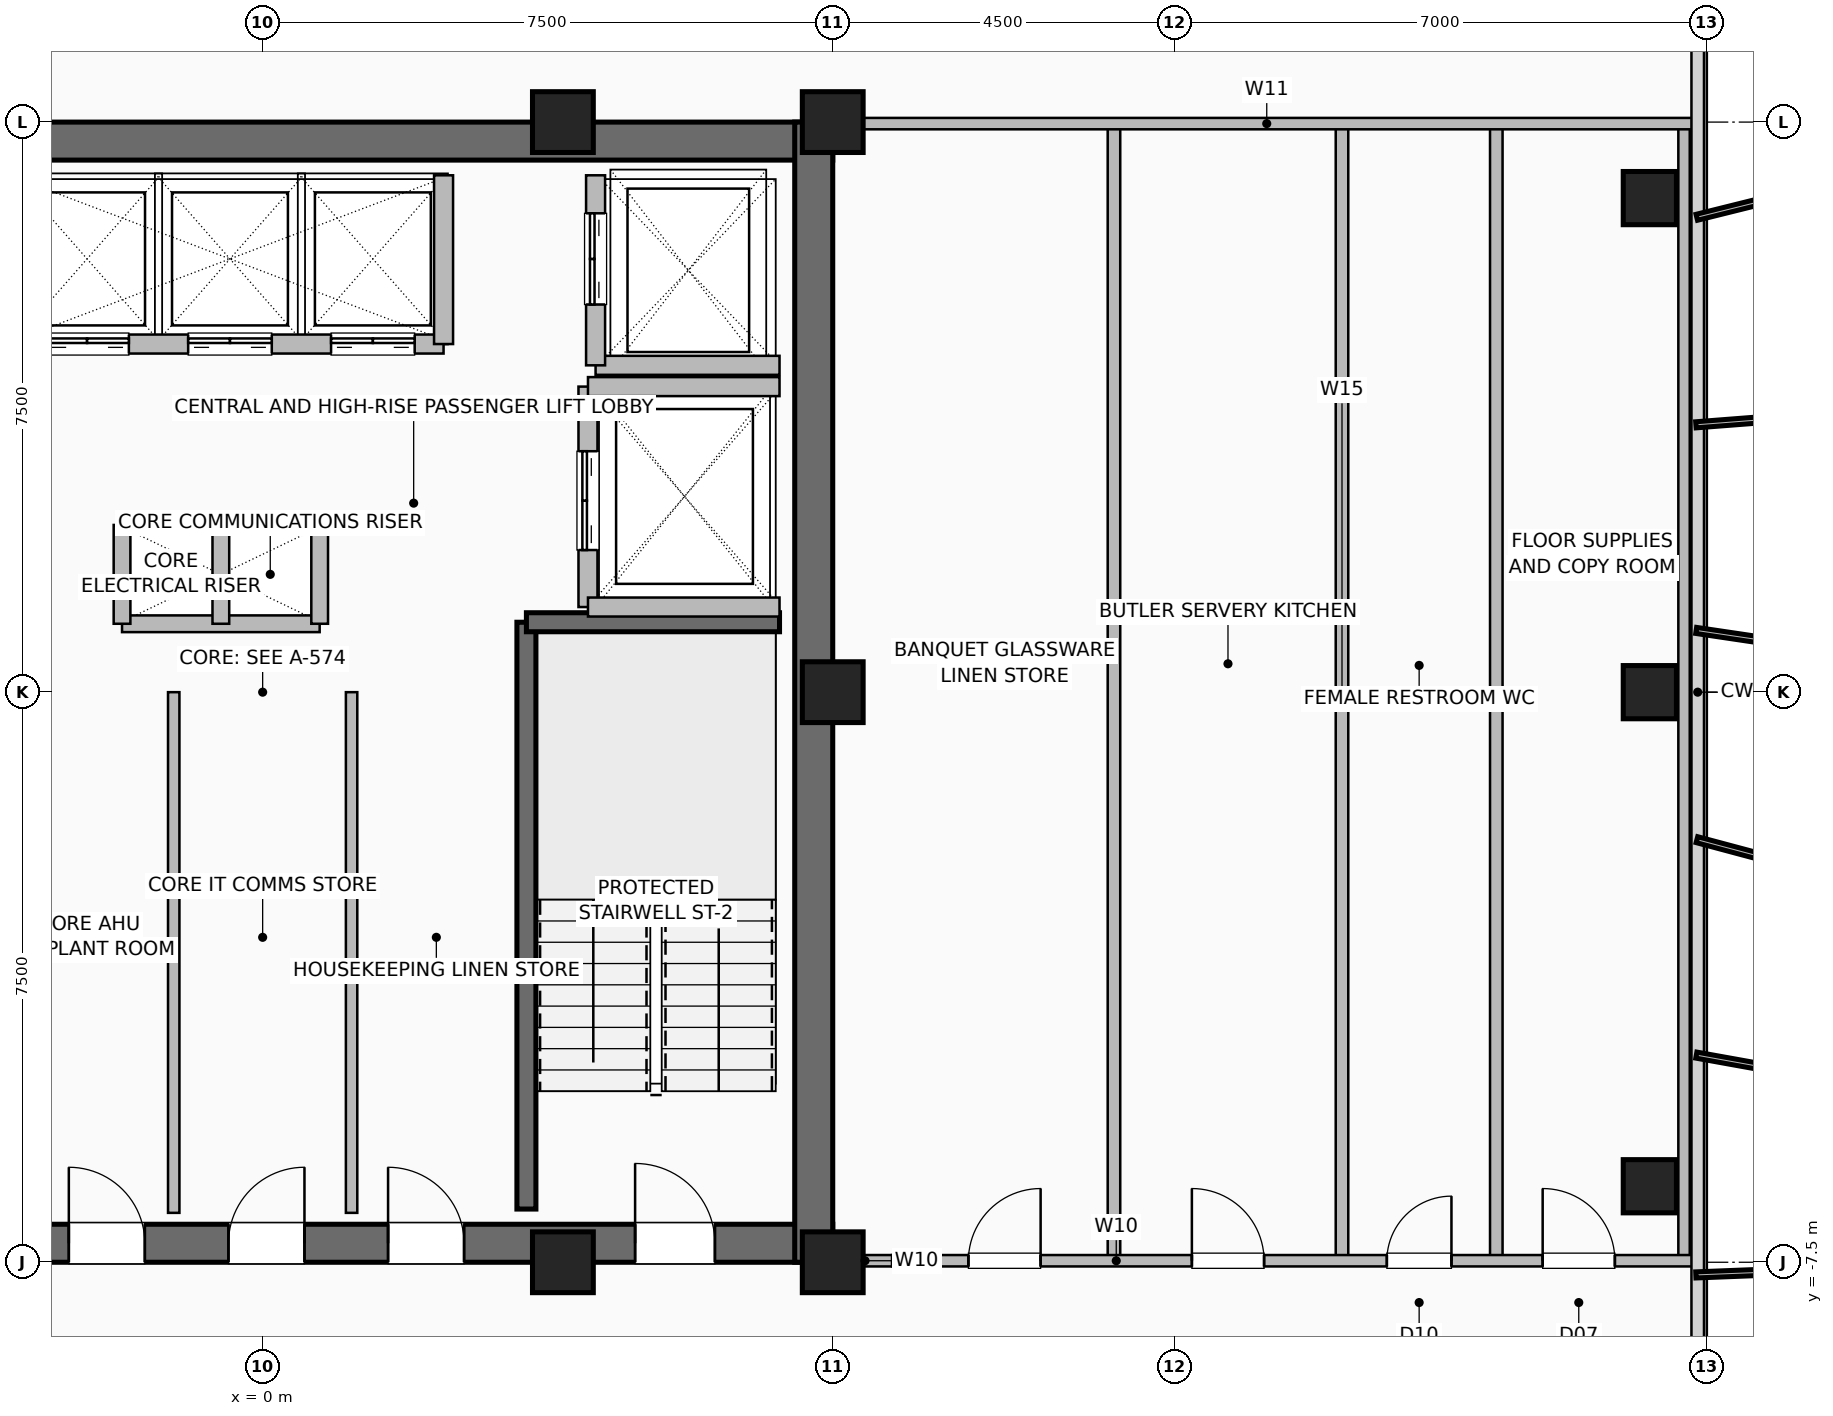
"""IFC4 building model, lengths in metres.
Left out: names, types, materials, properties, quantities, classifications, styles, units other than length and angle.
Written with IfcOpenShell. Run it as: python <this file> out.ifc"""

import sys

from ifc_helpers import new_model, si_unit, direction, frame, frame_2d, origin, origin_2d, place, context, subcontext, project, spatial, rectangle, hollow_rectangle, extrude, element, fill, save


model = new_model("IFC4")
c1 = context("Model", 3, precision=1e-05, world=origin(), true_north=direction((0.0, 1.0)))
c2 = subcontext(c1, "Body", "Model", "MODEL_VIEW")
j1 = project(units=[si_unit("LENGTHUNIT", "METRE"), si_unit("PLANEANGLEUNIT", "RADIAN")], contexts=[c1])
p1 = place(None, origin())
s1 = spatial("IfcSite", under=j1, at=p1, CompositionType="ELEMENT")
p2 = place(p1, origin())
s2 = spatial("IfcBuilding", under=s1, at=p2, CompositionType="ELEMENT")
p3 = place(p2, frame((0.0, 0.0, 293.6)))
s3 = spatial("IfcBuildingStorey", under=s2, at=p3, CompositionType="ELEMENT", Elevation=293.6)
for number, where, z_axis, x_axis in (
    (1, (3.95, -7.5, 0.0), (0.0, 0.0, 1.0), (1.0, 0.0, 0.0)),
    (2, (7.5, -7.5, 0.0), (0.0, 0.0, 1.0), (1.0, 0.0, 0.0)),
    (3, (7.5, 0.0, 0.0), (0.0, 0.0, 1.0), (1.0, 0.0, 0.0)),
    (4, (7.5, 7.5, 0.0), (0.0, 0.0, 1.0), (1.0, 0.0, 0.0)),
    (5, (3.95, 7.5, 0.0), (0.0, 0.0, 1.0), (1.0, 0.0, 0.0)),
):
    element("IfcColumn", number, at=place(p3, frame(where, z_axis=z_axis, x_axis=x_axis)), inside=s3, PredefinedType="COLUMN", context=c2, shape_type="SweptSolid", body=[
        extrude(hollow_rectangle(XDim=0.8, YDim=0.8, WallThickness=0.04, at=origin_2d()), origin(), (0.0, 0.0, 1.0), 3.6),
    ])
for number, where, z_axis, x_axis in (
    (6, (18.25, -6.5, 0.0), (0.0, 0.0, 1.0), (1.0, 0.0, 0.0)),
    (7, (18.25, 0.0, 0.0), (0.0, 0.0, 1.0), (1.0, 0.0, 0.0)),
    (8, (18.25, 6.5, 0.0), (0.0, 0.0, 1.0), (1.0, 0.0, 0.0)),
):
    element("IfcColumn", number, at=place(p3, frame(where, z_axis=z_axis, x_axis=x_axis)), inside=s3, PredefinedType="COLUMN", context=c2, shape_type="SweptSolid", body=[
        extrude(hollow_rectangle(XDim=0.7, YDim=0.7, WallThickness=0.035, at=origin_2d()), origin(), (0.0, 0.0, 1.0), 3.6),
    ])
p4 = place(p3, frame((-7.5, -7.25, 0.0), z_axis=(0.0, 0.0, 1.0), x_axis=(1.0, 0.0, 0.0)))
e9 = element("IfcWall", 9, at=p4, inside=s3, PredefinedType="SHEAR", context=c2, shape_type="SweptSolid", body=[
    extrude(rectangle(XDim=15.0, YDim=0.5, at=frame_2d((7.5, 0.0))), origin(), (0.0, 0.0, 1.0), 3.36),
])
p5 = place(p4, frame((1.55, 0.0, 0.0)))
e10 = element("IfcOpeningElement", 10, at=p5, cuts=e9, PredefinedType="OPENING", context=c2, shape_type="SweptSolid", body=[
    extrude(rectangle(XDim=1.05, YDim=2.08, at=frame_2d((0.525, 1.04))), frame((0.0, 0.26, 0.0), z_axis=(0.0, -1.0, 0.0), x_axis=(1.0, 0.0, 0.0)), (0.0, 0.0, 1.0), 0.52),
])
p6 = place(p4, frame((12.4, 0.0, 0.0)))
e11 = element("IfcOpeningElement", 11, at=p6, cuts=e9, PredefinedType="OPENING", context=c2, shape_type="SweptSolid", body=[
    extrude(rectangle(XDim=1.05, YDim=2.08, at=frame_2d((0.525, 1.04))), frame((0.0, 0.26, 0.0), z_axis=(0.0, -1.0, 0.0), x_axis=(1.0, 0.0, 0.0)), (0.0, 0.0, 1.0), 0.52),
])
p7 = place(p4, frame((4.95, 0.0, 0.0)))
e12 = element("IfcOpeningElement", 12, at=p7, cuts=e9, PredefinedType="OPENING", context=c2, shape_type="SweptSolid", body=[
    extrude(rectangle(XDim=1.0, YDim=2.08, at=frame_2d((0.5, 1.04))), frame((0.0, 0.26, 0.0), z_axis=(0.0, -1.0, 0.0), x_axis=(1.0, 0.0, 0.0)), (0.0, 0.0, 1.0), 0.52),
])
p8 = place(p4, frame((7.05, 0.0, 0.0)))
e13 = element("IfcOpeningElement", 13, at=p8, cuts=e9, PredefinedType="OPENING", context=c2, shape_type="SweptSolid", body=[
    extrude(rectangle(XDim=1.0, YDim=2.08, at=frame_2d((0.5, 1.04))), frame((0.0, 0.26, 0.0), z_axis=(0.0, -1.0, 0.0), x_axis=(1.0, 0.0, 0.0)), (0.0, 0.0, 1.0), 0.52),
])
p9 = place(p4, frame((9.15, 0.0, 0.0)))
e14 = element("IfcOpeningElement", 14, at=p9, cuts=e9, PredefinedType="OPENING", context=c2, shape_type="SweptSolid", body=[
    extrude(rectangle(XDim=1.0, YDim=2.08, at=frame_2d((0.5, 1.04))), frame((0.0, 0.26, 0.0), z_axis=(0.0, -1.0, 0.0), x_axis=(1.0, 0.0, 0.0)), (0.0, 0.0, 1.0), 0.52),
])
for number, where, z_axis, x_axis in (
    (15, (-7.5, 7.25, 0.0), (0.0, 0.0, 1.0), (1.0, 0.0, 0.0)),
    (16, (7.25, -7.5, 0.0), (0.0, 0.0, 1.0), (0.0, 1.0, 0.0)),
):
    element("IfcWall", number, at=place(p3, frame(where, z_axis=z_axis, x_axis=x_axis)), inside=s3, PredefinedType="SHEAR", context=c2, shape_type="SweptSolid", body=[
        extrude(rectangle(XDim=15.0, YDim=0.5, at=frame_2d((7.5, 0.0))), origin(), (0.0, 0.0, 1.0), 3.36),
    ])
p10 = place(p3, frame((3.47, -6.8, 0.0), z_axis=(0.0, 0.0, 1.0), x_axis=(0.0, 1.0, 0.0)))
e17 = element("IfcWall", 17, at=p10, inside=s3, PredefinedType="SHEAR", context=c2, shape_type="SweptSolid", body=[
    extrude(rectangle(XDim=7.72, YDim=0.25, at=frame_2d((3.86, 0.0))), origin(), (0.0, 0.0, 1.0), 3.36),
])
p11 = place(p3, frame((3.47, 0.92, 0.0), z_axis=(0.0, 0.0, 1.0), x_axis=(1.0, 0.0, 0.0)))
e18 = element("IfcWall", 18, at=p11, inside=s3, PredefinedType="SHEAR", context=c2, shape_type="SweptSolid", body=[
    extrude(rectangle(XDim=3.33, YDim=0.25, at=frame_2d((1.665, 0.0))), origin(), (0.0, 0.0, 1.0), 3.36),
])
for number, where, z_axis, x_axis in (
    (19, (-1.85, 2.2, 0.0), (0.0, 0.0, 1.0), (1.0, 0.0, 0.0)),
    (20, (-1.85, 0.9, 0.0), (0.0, 0.0, 1.0), (1.0, 0.0, 0.0)),
):
    element("IfcWall", number, at=place(p3, frame(where, z_axis=z_axis, x_axis=x_axis)), inside=s3, PredefinedType="PARTITIONING", context=c2, shape_type="SweptSolid", body=[
        extrude(rectangle(XDim=2.6, YDim=0.22, at=frame_2d((1.3, 0.0))), origin(), (0.0, 0.0, 1.0), 3.36),
    ])
for number, where, z_axis, x_axis in (
    (21, (-0.55, 0.9, 0.0), (0.0, 0.0, 1.0), (0.0, 1.0, 0.0)),
    (22, (0.75, 0.9, 0.0), (0.0, 0.0, 1.0), (0.0, 1.0, 0.0)),
    (23, (-1.85, 0.9, 0.0), (0.0, 0.0, 1.0), (0.0, 1.0, 0.0)),
):
    element("IfcWall", number, at=place(p3, frame(where, z_axis=z_axis, x_axis=x_axis)), inside=s3, PredefinedType="PARTITIONING", context=c2, shape_type="SweptSolid", body=[
        extrude(rectangle(XDim=1.3, YDim=0.22, at=frame_2d((0.65, 0.0))), origin(), (0.0, 0.0, 1.0), 3.36),
    ])
p12 = place(p3, frame((-3.26, 4.58, 0.0), z_axis=(0.0, 0.0, 1.0), x_axis=(1.0, 0.0, 0.0)))
e24 = element("IfcWall", 24, at=p12, inside=s3, PredefinedType="SHEAR", context=c2, shape_type="SweptSolid", body=[
    extrude(rectangle(XDim=5.64, YDim=0.25, at=frame_2d((2.82, 0.0))), origin(), (0.0, 0.0, 1.0), 3.36),
])
p13 = place(p12, frame((0.4, 0.0, 0.0)))
e25 = element("IfcOpeningElement", 25, at=p13, cuts=e24, PredefinedType="OPENING", context=c2, shape_type="SweptSolid", body=[
    extrude(rectangle(XDim=1.1, YDim=2.2, at=frame_2d((0.55, 1.1))), frame((0.0, 0.135, 0.0), z_axis=(0.0, -1.0, 0.0), x_axis=(1.0, 0.0, 0.0)), (0.0, 0.0, 1.0), 0.27),
])
p14 = place(p12, frame((2.28, 0.0, 0.0)))
e26 = element("IfcOpeningElement", 26, at=p14, cuts=e24, PredefinedType="OPENING", context=c2, shape_type="SweptSolid", body=[
    extrude(rectangle(XDim=1.1, YDim=2.2, at=frame_2d((0.55, 1.1))), frame((0.0, 0.135, 0.0), z_axis=(0.0, -1.0, 0.0), x_axis=(1.0, 0.0, 0.0)), (0.0, 0.0, 1.0), 0.27),
])
p15 = place(p12, frame((4.16, 0.0, 0.0)))
e27 = element("IfcOpeningElement", 27, at=p15, cuts=e24, PredefinedType="OPENING", context=c2, shape_type="SweptSolid", body=[
    extrude(rectangle(XDim=1.1, YDim=2.2, at=frame_2d((0.55, 1.1))), frame((0.0, 0.135, 0.0), z_axis=(0.0, -1.0, 0.0), x_axis=(1.0, 0.0, 0.0)), (0.0, 0.0, 1.0), 0.27),
])
p16 = place(p3, frame((2.38, 4.58, 0.0), z_axis=(0.0, 0.0, 1.0), x_axis=(0.0, 1.0, 0.0)))
e28 = element("IfcWall", 28, at=p16, inside=s3, PredefinedType="SHEAR", context=c2, shape_type="SweptSolid", body=[
    extrude(rectangle(XDim=2.22, YDim=0.25, at=frame_2d((1.11, 0.0))), origin(), (0.0, 0.0, 1.0), 3.36),
])
p17 = place(p3, frame((4.38, 4.3, 0.0), z_axis=(0.0, 0.0, 1.0), x_axis=(1.0, 0.0, 0.0)))
e29 = element("IfcWall", 29, at=p17, inside=s3, PredefinedType="SHEAR", context=c2, shape_type="SweptSolid", body=[
    extrude(rectangle(XDim=2.42, YDim=0.25, at=frame_2d((1.21, 0.0))), origin(), (0.0, 0.0, 1.0), 3.36),
])
p18 = place(p3, frame((4.38, 4.3, 0.0), z_axis=(0.0, 0.0, 1.0), x_axis=(0.0, 1.0, 0.0)))
e30 = element("IfcWall", 30, at=p18, inside=s3, PredefinedType="SHEAR", context=c2, shape_type="SweptSolid", body=[
    extrude(rectangle(XDim=2.5, YDim=0.25, at=frame_2d((1.25, 0.0))), origin(), (0.0, 0.0, 1.0), 3.36),
])
p19 = place(p18, frame((0.8, 0.0, 0.0)))
e31 = element("IfcOpeningElement", 31, at=p19, cuts=e30, PredefinedType="OPENING", context=c2, shape_type="SweptSolid", body=[
    extrude(rectangle(XDim=1.2, YDim=2.2, at=frame_2d((0.6, 1.1))), frame((0.0, 0.135, 0.0), z_axis=(0.0, -1.0, 0.0), x_axis=(1.0, 0.0, 0.0)), (0.0, 0.0, 1.0), 0.27),
])
p20 = place(p3, frame((4.28, 1.12, 0.0), z_axis=(0.0, 0.0, 1.0), x_axis=(0.0, 1.0, 0.0)))
e32 = element("IfcWall", 32, at=p20, inside=s3, PredefinedType="SHEAR", context=c2, shape_type="SweptSolid", body=[
    extrude(rectangle(XDim=2.9, YDim=0.25, at=frame_2d((1.45, 0.0))), origin(), (0.0, 0.0, 1.0), 3.36),
])
p21 = place(p20, frame((0.75, 0.0, 0.0)))
e33 = element("IfcOpeningElement", 33, at=p21, cuts=e32, PredefinedType="OPENING", context=c2, shape_type="SweptSolid", body=[
    extrude(rectangle(XDim=1.3, YDim=2.3, at=frame_2d((0.65, 1.15))), frame((0.0, 0.135, 0.0), z_axis=(0.0, -1.0, 0.0), x_axis=(1.0, 0.0, 0.0)), (0.0, 0.0, 1.0), 0.27),
])
for number, where, z_axis, x_axis in (
    (34, (4.28, 1.12, 0.0), (0.0, 0.0, 1.0), (1.0, 0.0, 0.0)),
    (35, (4.28, 4.02, 0.0), (0.0, 0.0, 1.0), (1.0, 0.0, 0.0)),
):
    element("IfcWall", number, at=place(p3, frame(where, z_axis=z_axis, x_axis=x_axis)), inside=s3, PredefinedType="SHEAR", context=c2, shape_type="SweptSolid", body=[
        extrude(rectangle(XDim=2.52, YDim=0.25, at=frame_2d((1.26, 0.0))), origin(), (0.0, 0.0, 1.0), 3.36),
    ])
for number, where, z_axis, x_axis in (
    (36, (-1.17, -6.85, 0.0), (0.0, 0.0, 1.0), (0.0, 1.0, 0.0)),
    (37, (1.17, -6.85, 0.0), (0.0, 0.0, 1.0), (0.0, 1.0, 0.0)),
):
    element("IfcWall", number, at=place(p3, frame(where, z_axis=z_axis, x_axis=x_axis)), inside=s3, PredefinedType="PARTITIONING", context=c2, shape_type="SweptSolid", body=[
        extrude(rectangle(XDim=6.85, YDim=0.15, at=frame_2d((3.425, 0.0))), origin(), (0.0, 0.0, 1.0), 3.36),
    ])
p22 = place(p3, frame((7.45, -7.48, 0.0), z_axis=(0.0, 0.0, 1.0), x_axis=(1.0, 0.0, 0.0)))
e38 = element("IfcWall", 38, at=p22, inside=s3, PredefinedType="PARTITIONING", context=c2, shape_type="SweptSolid", body=[
    extrude(rectangle(XDim=0.95, YDim=0.15, at=frame_2d((0.475, 0.0))), origin(), (0.0, 0.0, 1.0), 3.36),
])
for number, where, z_axis, x_axis in (
    (39, (16.23, -7.48, 0.0), (0.0, 0.0, 1.0), (0.0, 1.0, 0.0)),
    (40, (11.2, -7.48, 0.0), (0.0, 0.0, 1.0), (0.0, 1.0, 0.0)),
    (41, (14.2, -7.48, 0.0), (0.0, 0.0, 1.0), (0.0, 1.0, 0.0)),
):
    element("IfcWall", number, at=place(p3, frame(where, z_axis=z_axis, x_axis=x_axis)), inside=s3, PredefinedType="PLUMBINGWALL", context=c2, shape_type="SweptSolid", body=[
        extrude(rectangle(XDim=14.9, YDim=0.165, at=frame_2d((7.45, 0.0))), origin(), (0.0, 0.0, 1.0), 3.36),
    ])
p23 = place(p3, frame((18.7, -7.48, 0.0), z_axis=(0.0, 0.0, 1.0), x_axis=(0.0, 1.0, 0.0)))
e42 = element("IfcWall", 42, at=p23, inside=s3, PredefinedType="PARTITIONING", context=c2, shape_type="SweptSolid", body=[
    extrude(rectangle(XDim=14.9, YDim=0.15, at=frame_2d((7.45, 0.0))), origin(), (0.0, 0.0, 1.0), 3.36),
])
p24 = place(p3, frame((8.28, -7.48, 0.0), z_axis=(0.0, 0.0, 1.0), x_axis=(1.0, 0.0, 0.0)))
e43 = element("IfcWall", 43, at=p24, inside=s3, PredefinedType="PARTITIONING", context=c2, shape_type="SweptSolid", body=[
    extrude(rectangle(XDim=10.54, YDim=0.15, at=frame_2d((5.27, 0.0))), origin(), (0.0, 0.0, 1.0), 3.36),
])
p25 = place(p24, frame((1.005, 0.0, 0.0)))
e44 = element("IfcOpeningElement", 44, at=p25, cuts=e43, PredefinedType="OPENING", context=c2, shape_type="SweptSolid", body=[
    extrude(rectangle(XDim=0.95, YDim=2.06, at=frame_2d((0.475, 1.03))), frame((0.0, 0.085, 0.0), z_axis=(0.0, -1.0, 0.0), x_axis=(1.0, 0.0, 0.0)), (0.0, 0.0, 1.0), 0.17),
])
p26 = place(p24, frame((3.945, 0.0, 0.0)))
e45 = element("IfcOpeningElement", 45, at=p26, cuts=e43, PredefinedType="OPENING", context=c2, shape_type="SweptSolid", body=[
    extrude(rectangle(XDim=0.95, YDim=2.06, at=frame_2d((0.475, 1.03))), frame((0.0, 0.085, 0.0), z_axis=(0.0, -1.0, 0.0), x_axis=(1.0, 0.0, 0.0)), (0.0, 0.0, 1.0), 0.17),
])
p27 = place(p24, frame((6.51, 0.0, 0.0)))
e46 = element("IfcOpeningElement", 46, at=p27, cuts=e43, PredefinedType="OPENING", context=c2, shape_type="SweptSolid", body=[
    extrude(rectangle(XDim=0.85, YDim=2.05, at=frame_2d((0.425, 1.025))), frame((0.0, 0.085, 0.0), z_axis=(0.0, -1.0, 0.0), x_axis=(1.0, 0.0, 0.0)), (0.0, 0.0, 1.0), 0.17),
])
p28 = place(p24, frame((8.56, 0.0, 0.0)))
e47 = element("IfcOpeningElement", 47, at=p28, cuts=e43, PredefinedType="OPENING", context=c2, shape_type="SweptSolid", body=[
    extrude(rectangle(XDim=0.95, YDim=2.06, at=frame_2d((0.475, 1.03))), frame((0.0, 0.085, 0.0), z_axis=(0.0, -1.0, 0.0), x_axis=(1.0, 0.0, 0.0)), (0.0, 0.0, 1.0), 0.17),
])
p29 = place(p3, frame((7.6, 7.48, 0.0), z_axis=(0.0, 0.0, 1.0), x_axis=(1.0, 0.0, 0.0)))
e48 = element("IfcWall", 48, at=p29, inside=s3, PredefinedType="PARTITIONING", context=c2, shape_type="SweptSolid", body=[
    extrude(rectangle(XDim=11.22, YDim=0.15, at=frame_2d((5.61, 0.0))), origin(), (0.0, 0.0, 1.0), 3.36),
])
p30 = place(p6, origin())
e49 = element("IfcDoor", 49, at=p30, inside=s3, OperationType="SINGLE_SWING_LEFT", PredefinedType="DOOR", context=c2, shape_type="SweptSolid", body=[
    extrude(rectangle(XDim=1.05, YDim=2.08, at=frame_2d((0.525, 1.04))), frame((0.0, 0.025, 0.0), z_axis=(0.0, -1.0, 0.0), x_axis=(1.0, 0.0, 0.0)), (0.0, 0.0, 1.0), 0.05),
])
fill(e11, e49)
p31 = place(p7, origin())
e50 = element("IfcDoor", 50, at=p31, inside=s3, OperationType="SINGLE_SWING_LEFT", PredefinedType="DOOR", context=c2, shape_type="SweptSolid", body=[
    extrude(rectangle(XDim=1.0, YDim=2.08, at=frame_2d((0.5, 1.04))), frame((0.0, 0.025, 0.0), z_axis=(0.0, -1.0, 0.0), x_axis=(1.0, 0.0, 0.0)), (0.0, 0.0, 1.0), 0.05),
])
fill(e12, e50)
p32 = place(p8, origin())
e51 = element("IfcDoor", 51, at=p32, inside=s3, OperationType="SINGLE_SWING_RIGHT", PredefinedType="DOOR", context=c2, shape_type="SweptSolid", body=[
    extrude(rectangle(XDim=1.0, YDim=2.08, at=frame_2d((0.5, 1.04))), frame((0.0, 0.025, 0.0), z_axis=(0.0, -1.0, 0.0), x_axis=(1.0, 0.0, 0.0)), (0.0, 0.0, 1.0), 0.05),
])
fill(e13, e51)
p33 = place(p9, origin())
e52 = element("IfcDoor", 52, at=p33, inside=s3, OperationType="SINGLE_SWING_LEFT", PredefinedType="DOOR", context=c2, shape_type="SweptSolid", body=[
    extrude(rectangle(XDim=1.0, YDim=2.08, at=frame_2d((0.5, 1.04))), frame((0.0, 0.025, 0.0), z_axis=(0.0, -1.0, 0.0), x_axis=(1.0, 0.0, 0.0)), (0.0, 0.0, 1.0), 0.05),
])
fill(e14, e52)
p34 = place(p13, origin())
e53 = element("IfcDoor", 53, at=p34, inside=s3, OperationType="DOUBLE_DOOR_SLIDING", PredefinedType="DOOR", context=c2, shape_type="SweptSolid", body=[
    extrude(rectangle(XDim=1.1, YDim=2.2, at=frame_2d((0.55, 1.1))), frame((0.0, 0.025, 0.0), z_axis=(0.0, -1.0, 0.0), x_axis=(1.0, 0.0, 0.0)), (0.0, 0.0, 1.0), 0.05),
])
fill(e25, e53)
p35 = place(p14, origin())
e54 = element("IfcDoor", 54, at=p35, inside=s3, OperationType="DOUBLE_DOOR_SLIDING", PredefinedType="DOOR", context=c2, shape_type="SweptSolid", body=[
    extrude(rectangle(XDim=1.1, YDim=2.2, at=frame_2d((0.55, 1.1))), frame((0.0, 0.025, 0.0), z_axis=(0.0, -1.0, 0.0), x_axis=(1.0, 0.0, 0.0)), (0.0, 0.0, 1.0), 0.05),
])
fill(e26, e54)
p36 = place(p15, origin())
e55 = element("IfcDoor", 55, at=p36, inside=s3, OperationType="DOUBLE_DOOR_SLIDING", PredefinedType="DOOR", context=c2, shape_type="SweptSolid", body=[
    extrude(rectangle(XDim=1.1, YDim=2.2, at=frame_2d((0.55, 1.1))), frame((0.0, 0.025, 0.0), z_axis=(0.0, -1.0, 0.0), x_axis=(1.0, 0.0, 0.0)), (0.0, 0.0, 1.0), 0.05),
])
fill(e27, e55)
p37 = place(p19, origin())
e56 = element("IfcDoor", 56, at=p37, inside=s3, OperationType="DOUBLE_DOOR_SLIDING", PredefinedType="DOOR", context=c2, shape_type="SweptSolid", body=[
    extrude(rectangle(XDim=1.2, YDim=2.2, at=frame_2d((0.6, 1.1))), frame((0.0, 0.025, 0.0), z_axis=(0.0, -1.0, 0.0), x_axis=(1.0, 0.0, 0.0)), (0.0, 0.0, 1.0), 0.05),
])
fill(e31, e56)
p38 = place(p21, origin())
e57 = element("IfcDoor", 57, at=p38, inside=s3, OperationType="DOUBLE_DOOR_SLIDING", PredefinedType="DOOR", context=c2, shape_type="SweptSolid", body=[
    extrude(rectangle(XDim=1.3, YDim=2.3, at=frame_2d((0.65, 1.15))), frame((0.0, 0.025, 0.0), z_axis=(0.0, -1.0, 0.0), x_axis=(1.0, 0.0, 0.0)), (0.0, 0.0, 1.0), 0.05),
])
fill(e33, e57)
p39 = place(p25, origin())
e58 = element("IfcDoor", 58, at=p39, inside=s3, OperationType="SINGLE_SWING_RIGHT", PredefinedType="DOOR", context=c2, shape_type="SweptSolid", body=[
    extrude(rectangle(XDim=0.95, YDim=2.06, at=frame_2d((0.475, 1.03))), frame((0.0, 0.025, 0.0), z_axis=(0.0, -1.0, 0.0), x_axis=(1.0, 0.0, 0.0)), (0.0, 0.0, 1.0), 0.05),
])
fill(e44, e58)
p40 = place(p26, origin())
e59 = element("IfcDoor", 59, at=p40, inside=s3, OperationType="SINGLE_SWING_LEFT", PredefinedType="DOOR", context=c2, shape_type="SweptSolid", body=[
    extrude(rectangle(XDim=0.95, YDim=2.06, at=frame_2d((0.475, 1.03))), frame((0.0, 0.025, 0.0), z_axis=(0.0, -1.0, 0.0), x_axis=(1.0, 0.0, 0.0)), (0.0, 0.0, 1.0), 0.05),
])
fill(e45, e59)
p41 = place(p27, origin())
e60 = element("IfcDoor", 60, at=p41, inside=s3, OperationType="SINGLE_SWING_RIGHT", PredefinedType="DOOR", context=c2, shape_type="SweptSolid", body=[
    extrude(rectangle(XDim=0.85, YDim=2.05, at=frame_2d((0.425, 1.025))), frame((0.0, 0.025, 0.0), z_axis=(0.0, -1.0, 0.0), x_axis=(1.0, 0.0, 0.0)), (0.0, 0.0, 1.0), 0.05),
])
fill(e46, e60)
p42 = place(p28, origin())
e61 = element("IfcDoor", 61, at=p42, inside=s3, OperationType="SINGLE_SWING_LEFT", PredefinedType="DOOR", context=c2, shape_type="SweptSolid", body=[
    extrude(rectangle(XDim=0.95, YDim=2.06, at=frame_2d((0.475, 1.03))), frame((0.0, 0.025, 0.0), z_axis=(0.0, -1.0, 0.0), x_axis=(1.0, 0.0, 0.0)), (0.0, 0.0, 1.0), 0.05),
])
fill(e47, e61)
save(model, sys.argv[1])
